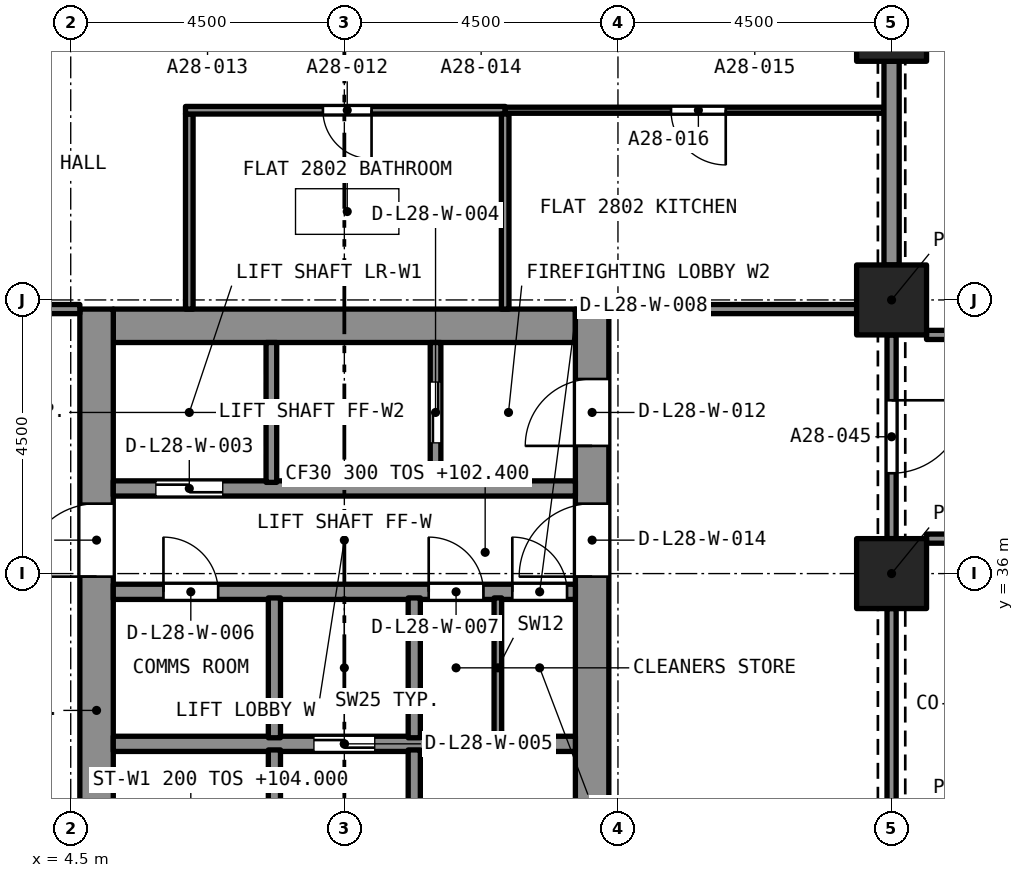
"""IFC4 building model, lengths in metres.
Left out: names, types, materials, properties, quantities, classifications, styles, units other than length and angle.
Written with IfcOpenShell. Run it as: python <this file> out.ifc"""

import sys

from ifc_helpers import new_model, si_unit, direction, frame, frame_2d, origin, origin_2d, place, context, subcontext, project, spatial, rectangle, extrude, element, fill, save


model = new_model("IFC4")
c1 = context("Model", 3, precision=1e-05, world=origin(), true_north=direction((0.0, 1.0)))
c2 = subcontext(c1, "Body", "Model", "MODEL_VIEW")
j1 = project(units=[si_unit("LENGTHUNIT", "METRE"), si_unit("PLANEANGLEUNIT", "RADIAN")], contexts=[c1])
p1 = place(None, origin())
s1 = spatial("IfcSite", under=j1, at=p1, CompositionType="ELEMENT")
p2 = place(p1, origin())
s2 = spatial("IfcBuilding", under=s1, at=p2, CompositionType="ELEMENT")
p3 = place(p2, frame((0.0, 0.0, 102.4)))
s3 = spatial("IfcBuildingStorey", under=s2, at=p3, CompositionType="ELEMENT", Elevation=102.4)
for number, where, z_axis, x_axis in (
    (1, (18.0, 36.0, 0.0), (0.0, 0.0, 1.0), (1.0, 0.0, 0.0)),
    (2, (18.0, 40.5, 0.0), (0.0, 0.0, 1.0), (1.0, 0.0, 0.0)),
    (3, (18.0, 45.0, 0.0), (0.0, 0.0, 1.0), (1.0, 0.0, 0.0)),
):
    element("IfcColumn", number, at=place(p3, frame(where, z_axis=z_axis, x_axis=x_axis)), inside=s3, PredefinedType="COLUMN", context=c2, shape_type="SweptSolid", body=[
        extrude(rectangle(XDim=1.15, YDim=1.15, at=origin_2d()), origin(), (0.0, 0.0, 1.0), 3.2),
    ])
p4 = place(p3, frame((5.2, 40.075, 0.0), z_axis=(0.0, 0.0, 1.0), x_axis=(1.0, 0.0, 0.0)))
e4 = element("IfcWall", 4, at=p4, inside=s3, PredefinedType="SOLIDWALL", context=c2, shape_type="SweptSolid", body=[
    extrude(rectangle(XDim=7.6, YDim=0.55, at=frame_2d((3.8, 0.0))), origin(), (0.0, 0.0, 1.0), 3.2),
])
p5 = place(p3, frame((4.925, 27.15, 0.0), z_axis=(0.0, 0.0, 1.0), x_axis=(0.0, 1.0, 0.0)))
e5 = element("IfcWall", 5, at=p5, inside=s3, PredefinedType="SOLIDWALL", context=c2, shape_type="SweptSolid", body=[
    extrude(rectangle(XDim=13.2, YDim=0.55, at=frame_2d((6.6, 0.0))), origin(), (0.0, 0.0, 1.0), 3.2),
])
p6 = place(p5, frame((8.8, 0.0, 0.0)))
e6 = element("IfcOpeningElement", 6, at=p6, cuts=e5, PredefinedType="OPENING", context=c2, shape_type="SweptSolid", body=[
    extrude(rectangle(XDim=1.2, YDim=2.1, at=frame_2d((0.6, 1.05))), frame((0.0, 0.285, 0.0), z_axis=(0.0, -1.0, 0.0), x_axis=(1.0, 0.0, 0.0)), (0.0, 0.0, 1.0), 0.57),
])
p7 = place(p3, frame((13.075, 27.15, 0.0), z_axis=(0.0, 0.0, 1.0), x_axis=(0.0, 1.0, 0.0)))
e7 = element("IfcWall", 7, at=p7, inside=s3, PredefinedType="SOLIDWALL", context=c2, shape_type="SweptSolid", body=[
    extrude(rectangle(XDim=13.2, YDim=0.55, at=frame_2d((6.6, 0.0))), origin(), (0.0, 0.0, 1.0), 3.2),
])
p8 = place(p7, frame((10.95, 0.0, 0.0)))
e8 = element("IfcOpeningElement", 8, at=p8, cuts=e7, PredefinedType="OPENING", context=c2, shape_type="SweptSolid", body=[
    extrude(rectangle(XDim=1.1, YDim=2.1, at=frame_2d((0.55, 1.05))), frame((0.0, 0.285, 0.0), z_axis=(0.0, -1.0, 0.0), x_axis=(1.0, 0.0, 0.0)), (0.0, 0.0, 1.0), 0.57),
])
p9 = place(p7, frame((8.8, 0.0, 0.0)))
e9 = element("IfcOpeningElement", 9, at=p9, cuts=e7, PredefinedType="OPENING", context=c2, shape_type="SweptSolid", body=[
    extrude(rectangle(XDim=1.2, YDim=2.1, at=frame_2d((0.6, 1.05))), frame((0.0, 0.285, 0.0), z_axis=(0.0, -1.0, 0.0), x_axis=(1.0, 0.0, 0.0)), (0.0, 0.0, 1.0), 0.57),
])
p10 = place(p3, frame((6.45, 40.35, 0.0), z_axis=(0.0, 0.0, 1.0), x_axis=(0.0, 1.0, 0.0)))
e10 = element("IfcWall", 10, at=p10, inside=s3, PredefinedType="PARTITIONING", context=c2, shape_type="SweptSolid", body=[
    extrude(rectangle(XDim=3.208, YDim=0.125, at=frame_2d((1.604, 0.0))), origin(), (0.0, 0.0, 1.0), 2.9),
])
p11 = place(p3, frame((11.645, 43.62, 0.0), z_axis=(0.0, 0.0, 1.0), x_axis=(-1.0, 0.0, 0.0)))
e11 = element("IfcWall", 11, at=p11, inside=s3, PredefinedType="PARTITIONING", context=c2, shape_type="SweptSolid", body=[
    extrude(rectangle(XDim=5.258, YDim=0.125, at=frame_2d((2.629, 0.0))), origin(), (0.0, 0.0, 1.0), 2.9),
])
p12 = place(p11, frame((2.198, 0.0, 0.0)))
e12 = element("IfcOpeningElement", 12, at=p12, cuts=e11, PredefinedType="OPENING", context=c2, shape_type="SweptSolid", body=[
    extrude(rectangle(XDim=0.8, YDim=2.1, at=frame_2d((0.4, 1.05))), frame((0.0, 0.073, 0.0), z_axis=(0.0, -1.0, 0.0), x_axis=(1.0, 0.0, 0.0)), (0.0, 0.0, 1.0), 0.145),
])
p13 = place(p3, frame((11.645, 40.35, 0.0), z_axis=(0.0, 0.0, 1.0), x_axis=(0.0, 1.0, 0.0)))
e13 = element("IfcWall", 13, at=p13, inside=s3, PredefinedType="PARTITIONING", context=c2, shape_type="SweptSolid", body=[
    extrude(rectangle(XDim=3.208, YDim=0.125, at=frame_2d((1.604, 0.0))), origin(), (0.0, 0.0, 1.0), 2.9),
])
p14 = place(p3, frame((17.875, 43.62, 0.0), z_axis=(0.0, 0.0, 1.0), x_axis=(-1.0, 0.0, 0.0)))
e14 = element("IfcWall", 14, at=p14, inside=s3, PredefinedType="PARTITIONING", context=c2, shape_type="SweptSolid", body=[
    extrude(rectangle(XDim=6.23, YDim=0.1, at=frame_2d((3.115, 0.0))), origin(), (0.0, 0.0, 1.0), 2.9),
])
p15 = place(p14, frame((2.602, 0.0, 0.0)))
e15 = element("IfcOpeningElement", 15, at=p15, cuts=e14, PredefinedType="OPENING", context=c2, shape_type="SweptSolid", body=[
    extrude(rectangle(XDim=0.9, YDim=2.1, at=frame_2d((0.45, 1.05))), frame((0.0, 0.06, 0.0), z_axis=(0.0, -1.0, 0.0), x_axis=(1.0, 0.0, 0.0)), (0.0, 0.0, 1.0), 0.12),
])
p16 = place(p3, frame((0.575, 40.35, 0.0), z_axis=(0.0, 0.0, 1.0), x_axis=(1.0, 0.0, 0.0)))
e16 = element("IfcWall", 16, at=p16, inside=s3, PredefinedType="PARTITIONING", context=c2, shape_type="SweptSolid", body=[
    extrude(rectangle(XDim=4.075, YDim=0.15, at=frame_2d((2.038, 0.0))), origin(), (0.0, 0.0, 1.0), 2.9),
])
p17 = place(p16, frame((1.175, 0.0, 0.0)))
e17 = element("IfcOpeningElement", 17, at=p17, cuts=e16, PredefinedType="OPENING", context=c2, shape_type="SweptSolid", body=[
    extrude(rectangle(XDim=1.0, YDim=2.1, at=frame_2d((0.5, 1.05))), frame((0.0, 0.085, 0.0), z_axis=(0.0, -1.0, 0.0), x_axis=(1.0, 0.0, 0.0)), (0.0, 0.0, 1.0), 0.17),
])
p18 = place(p3, frame((18.0, 41.075, 0.0), z_axis=(0.0, 0.0, 1.0), x_axis=(0.0, 1.0, 0.0)))
e18 = element("IfcWall", 18, at=p18, inside=s3, PredefinedType="PARTITIONING", context=c2, shape_type="SweptSolid", body=[
    extrude(rectangle(XDim=3.35, YDim=0.25, at=frame_2d((1.675, 0.0))), origin(), (0.0, 0.0, 1.0), 2.38),
])
p19 = place(p3, frame((13.35, 40.35, 0.0), z_axis=(0.0, 0.0, 1.0), x_axis=(1.0, 0.0, 0.0)))
e19 = element("IfcWall", 19, at=p19, inside=s3, PredefinedType="PARTITIONING", context=c2, shape_type="SweptSolid", body=[
    extrude(rectangle(XDim=4.075, YDim=0.15, at=frame_2d((2.038, 0.0))), origin(), (0.0, 0.0, 1.0), 2.9),
])
p20 = place(p3, frame((18.575, 39.925, 0.0), z_axis=(0.0, 0.0, 1.0), x_axis=(1.0, 0.0, 0.0)))
e20 = element("IfcWall", 20, at=p20, inside=s3, PredefinedType="PARTITIONING", context=c2, shape_type="SweptSolid", body=[
    extrude(rectangle(XDim=8.425, YDim=0.15, at=frame_2d((4.212, 0.0))), origin(), (0.0, 0.0, 1.0), 2.75),
])
p21 = place(p20, frame((3.425, 0.0, 0.0)))
e21 = element("IfcOpeningElement", 21, at=p21, cuts=e20, PredefinedType="OPENING", context=c2, shape_type="SweptSolid", body=[
    extrude(rectangle(XDim=1.0, YDim=2.1, at=frame_2d((0.5, 1.05))), frame((0.0, 0.085, 0.0), z_axis=(0.0, -1.0, 0.0), x_axis=(1.0, 0.0, 0.0)), (0.0, 0.0, 1.0), 0.17),
])
p22 = place(p3, frame((22.5, 36.575, 0.0), z_axis=(0.0, 0.0, 1.0), x_axis=(-1.0, 0.0, 0.0)))
e22 = element("IfcWall", 22, at=p22, inside=s3, PredefinedType="PARTITIONING", context=c2, shape_type="SweptSolid", body=[
    extrude(rectangle(XDim=3.925, YDim=0.15, at=frame_2d((1.962, 0.0))), origin(), (0.0, 0.0, 1.0), 2.75),
])
p23 = place(p22, frame((1.75, 0.0, 0.0)))
e23 = element("IfcOpeningElement", 23, at=p23, cuts=e22, PredefinedType="OPENING", context=c2, shape_type="SweptSolid", body=[
    extrude(rectangle(XDim=1.0, YDim=2.1, at=frame_2d((0.5, 1.05))), frame((0.0, 0.085, 0.0), z_axis=(0.0, -1.0, 0.0), x_axis=(1.0, 0.0, 0.0)), (0.0, 0.0, 1.0), 0.17),
])
p24 = place(p3, frame((18.0, 39.925, 0.0), z_axis=(0.0, 0.0, 1.0), x_axis=(0.0, -1.0, 0.0)))
e24 = element("IfcWall", 24, at=p24, inside=s3, PredefinedType="PARTITIONING", context=c2, shape_type="SweptSolid", body=[
    extrude(rectangle(XDim=3.35, YDim=0.15, at=frame_2d((1.675, 0.0))), origin(), (0.0, 0.0, 1.0), 2.38),
])
p25 = place(p24, frame((1.075, 0.0, 0.0)))
e25 = element("IfcOpeningElement", 25, at=p25, cuts=e24, PredefinedType="OPENING", context=c2, shape_type="SweptSolid", body=[
    extrude(rectangle(XDim=1.2, YDim=2.1, at=frame_2d((0.6, 1.05))), frame((0.0, 0.085, 0.0), z_axis=(0.0, -1.0, 0.0), x_axis=(1.0, 0.0, 0.0)), (0.0, 0.0, 1.0), 0.17),
])
p26 = place(p3, frame((18.0, 32.075, 0.0), z_axis=(0.0, 0.0, 1.0), x_axis=(0.0, 1.0, 0.0)))
e26 = element("IfcWall", 26, at=p26, inside=s3, PredefinedType="PARTITIONING", context=c2, shape_type="SweptSolid", body=[
    extrude(rectangle(XDim=3.35, YDim=0.15, at=frame_2d((1.675, 0.0))), origin(), (0.0, 0.0, 1.0), 2.38),
])
p27 = place(p3, frame((5.2, 33.2, 0.0), z_axis=(0.0, 0.0, 1.0), x_axis=(1.0, 0.0, 0.0)))
e27 = element("IfcWall", 27, at=p27, inside=s3, PredefinedType="SOLIDWALL", context=c2, shape_type="SweptSolid", body=[
    extrude(rectangle(XDim=7.6, YDim=0.25, at=frame_2d((3.8, 0.0))), origin(), (0.0, 0.0, 1.0), 2.9),
])
p28 = place(p27, frame((3.3, 0.0, 0.0)))
e28 = element("IfcOpeningElement", 28, at=p28, cuts=e27, PredefinedType="OPENING", context=c2, shape_type="SweptSolid", body=[
    extrude(rectangle(XDim=1.0, YDim=2.1, at=frame_2d((0.5, 1.05))), frame((0.0, 0.135, 0.0), z_axis=(0.0, -1.0, 0.0), x_axis=(1.0, 0.0, 0.0)), (0.0, 0.0, 1.0), 0.27),
])
p29 = place(p3, frame((5.2, 35.7, 0.0), z_axis=(0.0, 0.0, 1.0), x_axis=(1.0, 0.0, 0.0)))
e29 = element("IfcWall", 29, at=p29, inside=s3, PredefinedType="SOLIDWALL", context=c2, shape_type="SweptSolid", body=[
    extrude(rectangle(XDim=7.6, YDim=0.25, at=frame_2d((3.8, 0.0))), origin(), (0.0, 0.0, 1.0), 2.9),
])
p30 = place(p29, frame((0.825, 0.0, 0.0)))
e30 = element("IfcOpeningElement", 30, at=p30, cuts=e29, PredefinedType="OPENING", context=c2, shape_type="SweptSolid", body=[
    extrude(rectangle(XDim=0.9, YDim=2.1, at=frame_2d((0.45, 1.05))), frame((0.0, 0.135, 0.0), z_axis=(0.0, -1.0, 0.0), x_axis=(1.0, 0.0, 0.0)), (0.0, 0.0, 1.0), 0.27),
])
p31 = place(p29, frame((5.188, 0.0, 0.0)))
e31 = element("IfcOpeningElement", 31, at=p31, cuts=e29, PredefinedType="OPENING", context=c2, shape_type="SweptSolid", body=[
    extrude(rectangle(XDim=0.9, YDim=2.1, at=frame_2d((0.45, 1.05))), frame((0.0, 0.135, 0.0), z_axis=(0.0, -1.0, 0.0), x_axis=(1.0, 0.0, 0.0)), (0.0, 0.0, 1.0), 0.27),
])
p32 = place(p29, frame((6.562, 0.0, 0.0)))
e32 = element("IfcOpeningElement", 32, at=p32, cuts=e29, PredefinedType="OPENING", context=c2, shape_type="SweptSolid", body=[
    extrude(rectangle(XDim=0.9, YDim=2.1, at=frame_2d((0.45, 1.05))), frame((0.0, 0.135, 0.0), z_axis=(0.0, -1.0, 0.0), x_axis=(1.0, 0.0, 0.0)), (0.0, 0.0, 1.0), 0.27),
])
p33 = place(p3, frame((5.2, 37.4, 0.0), z_axis=(0.0, 0.0, 1.0), x_axis=(1.0, 0.0, 0.0)))
e33 = element("IfcWall", 33, at=p33, inside=s3, PredefinedType="SOLIDWALL", context=c2, shape_type="SweptSolid", body=[
    extrude(rectangle(XDim=7.6, YDim=0.25, at=frame_2d((3.8, 0.0))), origin(), (0.0, 0.0, 1.0), 2.9),
])
p34 = place(p33, frame((0.7, 0.0, 0.0)))
e34 = element("IfcOpeningElement", 34, at=p34, cuts=e33, PredefinedType="OPENING", context=c2, shape_type="SweptSolid", body=[
    extrude(rectangle(XDim=1.1, YDim=2.4, at=frame_2d((0.55, 1.2))), frame((0.0, 0.135, 0.0), z_axis=(0.0, -1.0, 0.0), x_axis=(1.0, 0.0, 0.0)), (0.0, 0.0, 1.0), 0.27),
])
p35 = place(p3, frame((7.85, 27.7, 0.0), z_axis=(0.0, 0.0, 1.0), x_axis=(0.0, 1.0, 0.0)))
e35 = element("IfcWall", 35, at=p35, inside=s3, PredefinedType="SOLIDWALL", context=c2, shape_type="SweptSolid", body=[
    extrude(rectangle(XDim=5.4, YDim=0.2, at=frame_2d((2.7, 0.0))), origin(), (0.0, 0.0, 1.0), 2.9),
])
p36 = place(p35, frame((0.2, 0.0, 0.0)))
e36 = element("IfcOpeningElement", 36, at=p36, cuts=e35, PredefinedType="OPENING", context=c2, shape_type="SweptSolid", body=[
    extrude(rectangle(XDim=0.9, YDim=2.1, at=frame_2d((0.45, 1.05))), frame((0.0, 0.11, 0.0), z_axis=(0.0, -1.0, 0.0), x_axis=(1.0, 0.0, 0.0)), (0.0, 0.0, 1.0), 0.22),
])
p37 = place(p3, frame((10.15, 27.7, 0.0), z_axis=(0.0, 0.0, 1.0), x_axis=(0.0, 1.0, 0.0)))
e37 = element("IfcWall", 37, at=p37, inside=s3, PredefinedType="SOLIDWALL", context=c2, shape_type="SweptSolid", body=[
    extrude(rectangle(XDim=5.4, YDim=0.2, at=frame_2d((2.7, 0.0))), origin(), (0.0, 0.0, 1.0), 2.9),
])
p38 = place(p37, frame((0.2, 0.0, 0.0)))
e38 = element("IfcOpeningElement", 38, at=p38, cuts=e37, PredefinedType="OPENING", context=c2, shape_type="SweptSolid", body=[
    extrude(rectangle(XDim=0.9, YDim=2.1, at=frame_2d((0.45, 1.05))), frame((0.0, 0.11, 0.0), z_axis=(0.0, -1.0, 0.0), x_axis=(1.0, 0.0, 0.0)), (0.0, 0.0, 1.0), 0.22),
])
for number, where, z_axis, x_axis in (
    (39, (7.85, 33.3, 0.0), (0.0, 0.0, 1.0), (0.0, 1.0, 0.0)),
    (40, (10.15, 33.3, 0.0), (0.0, 0.0, 1.0), (0.0, 1.0, 0.0)),
):
    element("IfcWall", number, at=place(p3, frame(where, z_axis=z_axis, x_axis=x_axis)), inside=s3, PredefinedType="SOLIDWALL", context=c2, shape_type="SweptSolid", body=[
        extrude(rectangle(XDim=2.3, YDim=0.2, at=frame_2d((1.15, 0.0))), origin(), (0.0, 0.0, 1.0), 2.9),
    ])
p39 = place(p3, frame((7.8, 37.5, 0.0), z_axis=(0.0, 0.0, 1.0), x_axis=(0.0, 1.0, 0.0)))
e41 = element("IfcWall", 41, at=p39, inside=s3, PredefinedType="SOLIDWALL", context=c2, shape_type="SweptSolid", body=[
    extrude(rectangle(XDim=2.3, YDim=0.175, at=frame_2d((1.15, 0.0))), origin(), (0.0, 0.0, 1.0), 2.9),
])
p40 = place(p3, frame((10.5, 37.5, 0.0), z_axis=(0.0, 0.0, 1.0), x_axis=(0.0, 1.0, 0.0)))
e42 = element("IfcWall", 42, at=p40, inside=s3, PredefinedType="SOLIDWALL", context=c2, shape_type="SweptSolid", body=[
    extrude(rectangle(XDim=2.3, YDim=0.175, at=frame_2d((1.15, 0.0))), origin(), (0.0, 0.0, 1.0), 2.9),
])
p41 = place(p40, frame((0.65, 0.0, 0.0)))
e43 = element("IfcOpeningElement", 43, at=p41, cuts=e42, PredefinedType="OPENING", context=c2, shape_type="SweptSolid", body=[
    extrude(rectangle(XDim=1.0, YDim=2.1, at=frame_2d((0.5, 1.05))), frame((0.0, 0.097, 0.0), z_axis=(0.0, -1.0, 0.0), x_axis=(1.0, 0.0, 0.0)), (0.0, 0.0, 1.0), 0.195),
])
p42 = place(p3, frame((11.525, 33.3, 0.0), z_axis=(0.0, 0.0, 1.0), x_axis=(0.0, 1.0, 0.0)))
e44 = element("IfcWall", 44, at=p42, inside=s3, PredefinedType="PARTITIONING", context=c2, shape_type="SweptSolid", body=[
    extrude(rectangle(XDim=2.3, YDim=0.125, at=frame_2d((1.15, 0.0))), origin(), (0.0, 0.0, 1.0), 2.9),
])
p43 = place(p12, origin())
e45 = element("IfcDoor", 45, at=p43, inside=s3, OperationType="SINGLE_SWING_LEFT", PredefinedType="DOOR", context=c2, shape_type="SweptSolid", body=[
    extrude(rectangle(XDim=0.8, YDim=2.1, at=frame_2d((0.4, 1.05))), frame((0.0, 0.025, 0.0), z_axis=(0.0, -1.0, 0.0), x_axis=(1.0, 0.0, 0.0)), (0.0, 0.0, 1.0), 0.05),
])
fill(e12, e45)
p44 = place(p15, origin())
e46 = element("IfcDoor", 46, at=p44, inside=s3, OperationType="SINGLE_SWING_LEFT", PredefinedType="DOOR", context=c2, shape_type="SweptSolid", body=[
    extrude(rectangle(XDim=0.9, YDim=2.1, at=frame_2d((0.45, 1.05))), frame((0.0, 0.025, 0.0), z_axis=(0.0, -1.0, 0.0), x_axis=(1.0, 0.0, 0.0)), (0.0, 0.0, 1.0), 0.05),
])
fill(e15, e46)
p45 = place(p25, origin())
e47 = element("IfcDoor", 47, at=p45, inside=s3, OperationType="SINGLE_SWING_LEFT", PredefinedType="DOOR", context=c2, shape_type="SweptSolid", body=[
    extrude(rectangle(XDim=1.2, YDim=2.1, at=frame_2d((0.6, 1.05))), frame((0.0, 0.025, 0.0), z_axis=(0.0, -1.0, 0.0), x_axis=(1.0, 0.0, 0.0)), (0.0, 0.0, 1.0), 0.05),
])
fill(e25, e47)
p46 = place(p34, origin())
e48 = element("IfcDoor", 48, at=p46, inside=s3, OperationType="SLIDING_TO_LEFT", PredefinedType="DOOR", context=c2, shape_type="SweptSolid", body=[
    extrude(rectangle(XDim=1.1, YDim=2.4, at=frame_2d((0.55, 1.2))), frame((0.0, 0.025, 0.0), z_axis=(0.0, -1.0, 0.0), x_axis=(1.0, 0.0, 0.0)), (0.0, 0.0, 1.0), 0.05),
])
fill(e34, e48)
p47 = place(p41, origin())
e49 = element("IfcDoor", 49, at=p47, inside=s3, OperationType="SLIDING_TO_LEFT", PredefinedType="DOOR", context=c2, shape_type="SweptSolid", body=[
    extrude(rectangle(XDim=1.0, YDim=2.1, at=frame_2d((0.5, 1.05))), frame((0.0, 0.025, 0.0), z_axis=(0.0, -1.0, 0.0), x_axis=(1.0, 0.0, 0.0)), (0.0, 0.0, 1.0), 0.05),
])
fill(e43, e49)
p48 = place(p28, origin())
e50 = element("IfcDoor", 50, at=p48, inside=s3, OperationType="SLIDING_TO_LEFT", PredefinedType="DOOR", context=c2, shape_type="SweptSolid", body=[
    extrude(rectangle(XDim=1.0, YDim=2.1, at=frame_2d((0.5, 1.05))), frame((0.0, 0.025, 0.0), z_axis=(0.0, -1.0, 0.0), x_axis=(1.0, 0.0, 0.0)), (0.0, 0.0, 1.0), 0.05),
])
fill(e28, e50)
p49 = place(p30, origin())
e51 = element("IfcDoor", 51, at=p49, inside=s3, OperationType="SINGLE_SWING_LEFT", PredefinedType="DOOR", context=c2, shape_type="SweptSolid", body=[
    extrude(rectangle(XDim=0.9, YDim=2.1, at=frame_2d((0.45, 1.05))), frame((0.0, 0.025, 0.0), z_axis=(0.0, -1.0, 0.0), x_axis=(1.0, 0.0, 0.0)), (0.0, 0.0, 1.0), 0.05),
])
fill(e30, e51)
p50 = place(p31, origin())
e52 = element("IfcDoor", 52, at=p50, inside=s3, OperationType="SINGLE_SWING_LEFT", PredefinedType="DOOR", context=c2, shape_type="SweptSolid", body=[
    extrude(rectangle(XDim=0.9, YDim=2.1, at=frame_2d((0.45, 1.05))), frame((0.0, 0.025, 0.0), z_axis=(0.0, -1.0, 0.0), x_axis=(1.0, 0.0, 0.0)), (0.0, 0.0, 1.0), 0.05),
])
fill(e31, e52)
p51 = place(p32, origin())
e53 = element("IfcDoor", 53, at=p51, inside=s3, OperationType="SINGLE_SWING_LEFT", PredefinedType="DOOR", context=c2, shape_type="SweptSolid", body=[
    extrude(rectangle(XDim=0.9, YDim=2.1, at=frame_2d((0.45, 1.05))), frame((0.0, 0.025, 0.0), z_axis=(0.0, -1.0, 0.0), x_axis=(1.0, 0.0, 0.0)), (0.0, 0.0, 1.0), 0.05),
])
fill(e32, e53)
p52 = place(p8, origin())
e54 = element("IfcDoor", 54, at=p52, inside=s3, OperationType="SINGLE_SWING_LEFT", PredefinedType="DOOR", context=c2, shape_type="SweptSolid", body=[
    extrude(rectangle(XDim=1.1, YDim=2.1, at=frame_2d((0.55, 1.05))), frame((0.0, 0.025, 0.0), z_axis=(0.0, -1.0, 0.0), x_axis=(1.0, 0.0, 0.0)), (0.0, 0.0, 1.0), 0.05),
])
fill(e8, e54)
p53 = place(p6, origin())
e55 = element("IfcDoor", 55, at=p53, inside=s3, OperationType="SINGLE_SWING_LEFT", PredefinedType="DOOR", context=c2, shape_type="SweptSolid", body=[
    extrude(rectangle(XDim=1.2, YDim=2.1, at=frame_2d((0.6, 1.05))), frame((0.0, 0.025, 0.0), z_axis=(0.0, -1.0, 0.0), x_axis=(1.0, 0.0, 0.0)), (0.0, 0.0, 1.0), 0.05),
])
fill(e6, e55)
p54 = place(p9, origin())
e56 = element("IfcDoor", 56, at=p54, inside=s3, OperationType="SINGLE_SWING_LEFT", PredefinedType="DOOR", context=c2, shape_type="SweptSolid", body=[
    extrude(rectangle(XDim=1.2, YDim=2.1, at=frame_2d((0.6, 1.05))), frame((0.0, 0.025, 0.0), z_axis=(0.0, -1.0, 0.0), x_axis=(1.0, 0.0, 0.0)), (0.0, 0.0, 1.0), 0.05),
])
fill(e9, e56)
save(model, sys.argv[1])
